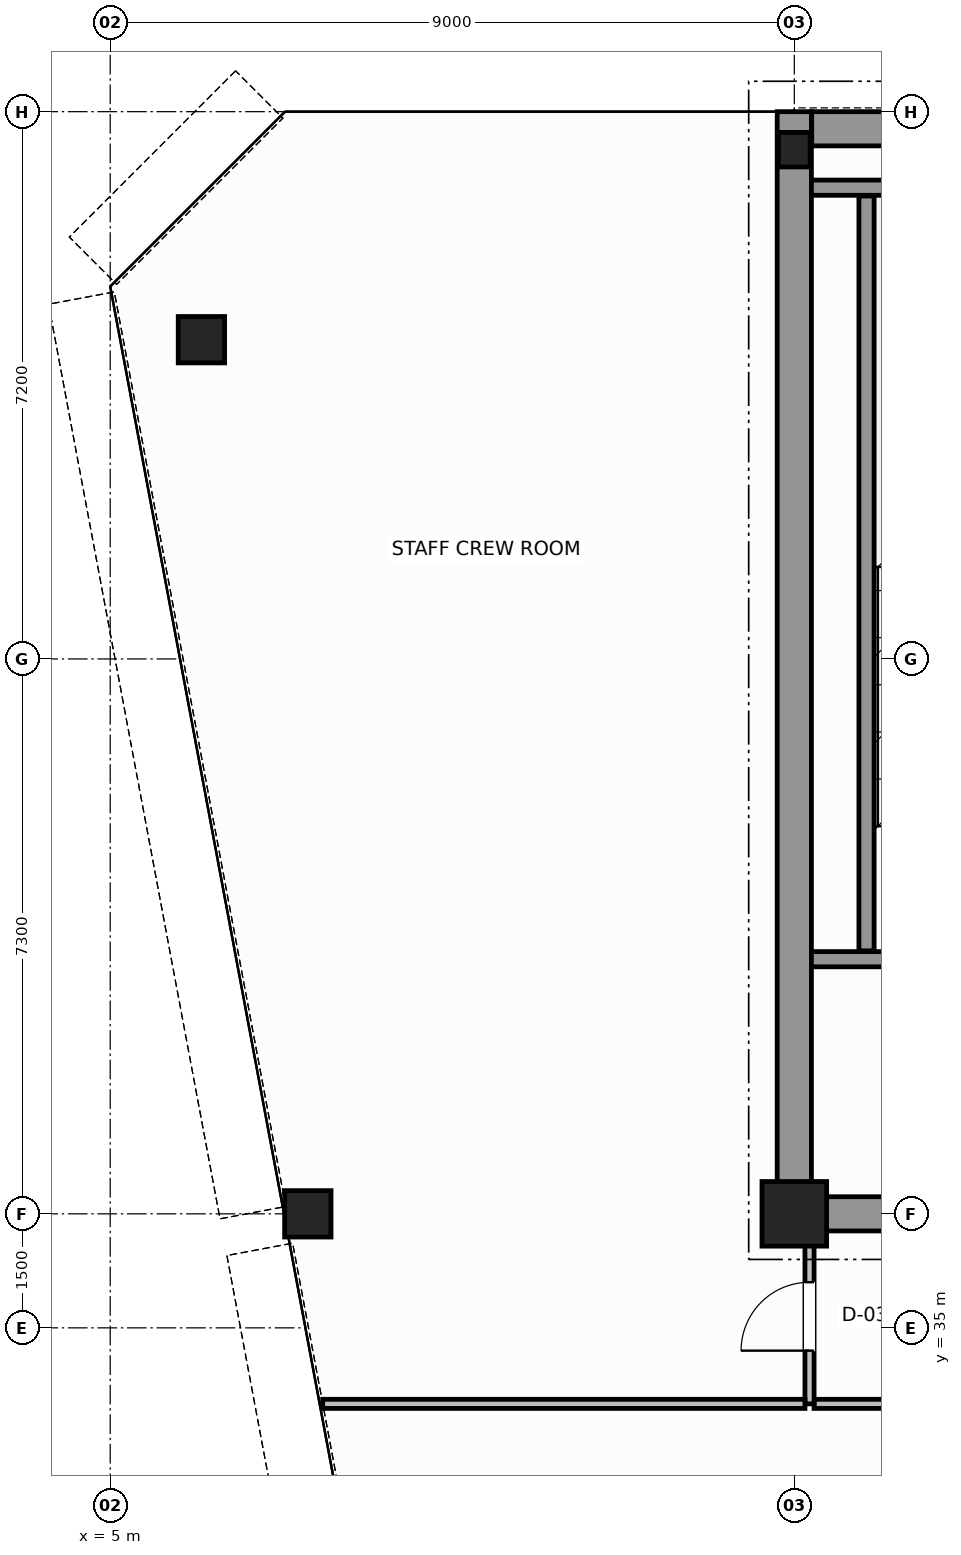
"""IFC4 building model, lengths in metres.
Left out: names, types, materials, properties, quantities, classifications, styles, units other than length and angle.
Written with IfcOpenShell. Run it as: python <this file> out.ifc"""

import sys

from ifc_helpers import new_model, si_unit, direction, frame, frame_2d, origin, origin_2d, place, context, subcontext, project, spatial, rectangle, hollow_circle, i_section, extrude, source, transform, mapped, element, fill, save


model = new_model("IFC4")
c1 = context("Model", 3, precision=1e-05, world=origin(), true_north=direction((0.0, 1.0)))
c2 = subcontext(c1, "Body", "Model", "MODEL_VIEW")
j1 = project(units=[si_unit("LENGTHUNIT", "METRE"), si_unit("PLANEANGLEUNIT", "RADIAN")], contexts=[c1])
p1 = place(None, origin())
s1 = spatial("IfcSite", under=j1, at=p1, CompositionType="ELEMENT")
p2 = place(p1, origin())
s2 = spatial("IfcBuilding", under=s1, at=p2, CompositionType="ELEMENT")
p3 = place(p2, frame((0.0, 0.0, 268.8)))
s3 = spatial("IfcBuildingStorey", under=s2, at=p3, CompositionType="ELEMENT", Elevation=268.8)
m1 = source(origin(), c2, "Body", "SweptSolid", [
    extrude(rectangle(XDim=0.85, YDim=0.85, at=origin_2d()), origin(), (0.0, 0.0, 1.0), 3.8),
])
p4 = place(p3, frame((14.0, 36.5, 0.0), z_axis=(0.0, 0.0, 1.0), x_axis=(1.0, 0.0, 0.0)))
e1 = element("IfcColumn", 1, at=p4, inside=s3, PredefinedType="COLUMN", context=c2, shape_type="MappedRepresentation", body=[
    mapped(m1, transform((0.0, 0.0, 0.0), scale=1.0)),
])
m2 = source(origin(), c2, "Body", "SweptSolid", [
    extrude(i_section(OverallWidth=0.418, OverallDepth=0.455, WebThickness=0.042, FlangeThickness=0.058, FilletRadius=0.015, at=origin_2d()), origin(), (0.0, 0.0, 1.0), 3.8),
])
p5 = place(p3, frame((14.0, 50.5, 0.0), z_axis=(0.0, 0.0, 1.0), x_axis=(1.0, 0.0, 0.0)))
e2 = element("IfcColumn", 2, at=p5, inside=s3, PredefinedType="COLUMN", context=c2, shape_type="MappedRepresentation", body=[
    mapped(m2, transform((0.0, 0.0, 0.0), scale=1.0)),
])
m3 = source(origin(), c2, "Body", "SweptSolid", [
    extrude(hollow_circle(Radius=0.305, WallThickness=0.03, at=origin_2d()), origin(), (0.0, 0.0, 1.0), 3.8),
])
for number, where, z_axis, x_axis in (
    (3, (6.2, 48.0, 0.0), (0.0, 0.0, 1.0), (1.0, 0.0, 0.0)),
    (4, (7.6, 36.5, 0.0), (0.0, 0.0, 1.0), (1.0, 0.0, 0.0)),
):
    element("IfcColumn", number, at=place(p3, frame(where, z_axis=z_axis, x_axis=x_axis)), inside=s3, PredefinedType="COLUMN", context=c2, shape_type="MappedRepresentation", body=[
        mapped(m3, transform((0.0, 0.0, 0.0), scale=1.0)),
    ])
p6 = place(p3, frame((14.229, 50.775, 0.0), z_axis=(0.0, 0.0, 1.0), x_axis=(1.0, 0.0, 0.0)))
e5 = element("IfcWall", 5, at=p6, inside=s3, PredefinedType="SHEAR", context=c2, shape_type="SweptSolid", body=[
    extrude(rectangle(XDim=19.769, YDim=0.45, at=frame_2d((9.885, 0.0))), origin(), (0.0, 0.0, 1.0), 3.8),
])
p7 = place(p3, frame((14.0, 36.5, 0.0), z_axis=(0.0, 0.0, 1.0), x_axis=(0.0, 1.0, 0.0)))
e6 = element("IfcWall", 6, at=p7, inside=s3, PredefinedType="SHEAR", context=c2, shape_type="SweptSolid", body=[
    extrude(rectangle(XDim=14.5, YDim=0.45, at=frame_2d((7.25, 0.0))), origin(), (0.0, 0.0, 1.0), 3.8),
])
p8 = place(p3, frame((14.245, 36.5, 0.0), z_axis=(0.0, 0.0, 1.0), x_axis=(1.0, 0.0, 0.0)))
e7 = element("IfcWall", 7, at=p8, inside=s3, PredefinedType="SHEAR", context=c2, shape_type="SweptSolid", body=[
    extrude(rectangle(XDim=3.955, YDim=0.45, at=frame_2d((1.978, 0.0))), origin(), (0.0, 0.0, 1.0), 2.58),
])
p9 = place(p3, frame((14.225, 39.85, 0.0), z_axis=(0.0, 0.0, 1.0), x_axis=(1.0, 0.0, 0.0)))
e8 = element("IfcWall", 8, at=p9, inside=s3, PredefinedType="SOLIDWALL", context=c2, shape_type="SweptSolid", body=[
    extrude(rectangle(XDim=4.375, YDim=0.2, at=frame_2d((2.188, 0.0))), origin(), (0.0, 0.0, 1.0), 3.8),
])
p10 = place(p9, frame((1.95, 0.0, 0.0)))
e9 = element("IfcOpeningElement", 9, at=p10, cuts=e8, PredefinedType="OPENING", context=c2, shape_type="SweptSolid", body=[
    extrude(rectangle(XDim=1.1, YDim=2.15, at=frame_2d((0.55, 1.075))), frame((0.0, 0.11, 0.0), z_axis=(0.0, -1.0, 0.0), x_axis=(1.0, 0.0, 0.0)), (0.0, 0.0, 1.0), 0.22),
])
p11 = place(p3, frame((14.225, 50.0, 0.0), z_axis=(0.0, 0.0, 1.0), x_axis=(1.0, 0.0, 0.0)))
e10 = element("IfcWall", 10, at=p11, inside=s3, PredefinedType="SOLIDWALL", context=c2, shape_type="SweptSolid", body=[
    extrude(rectangle(XDim=4.375, YDim=0.2, at=frame_2d((2.188, 0.0))), origin(), (0.0, 0.0, 1.0), 3.8),
])
p12 = place(p3, frame((14.95, 39.96, 0.0), z_axis=(0.0, 0.0, 1.0), x_axis=(0.0, 1.0, 0.0)))
e11 = element("IfcWall", 11, at=p12, inside=s3, PredefinedType="SOLIDWALL", context=c2, shape_type="SweptSolid", body=[
    extrude(rectangle(XDim=9.93, YDim=0.2, at=frame_2d((4.965, 0.0))), origin(), (0.0, 0.0, 1.0), 3.8),
])
p13 = place(p3, frame((14.26, 34.0, 0.0), z_axis=(0.0, 0.0, 1.0), x_axis=(1.0, 0.0, 0.0)))
e12 = element("IfcWall", 12, at=p13, inside=s3, PredefinedType="PARTITIONING", context=c2, shape_type="SweptSolid", body=[
    extrude(rectangle(XDim=10.48, YDim=0.12, at=frame_2d((5.24, 0.0))), origin(), (0.0, 0.0, 1.0), 3.58),
])
p14 = place(p3, frame((14.2, 34.0, 0.0), z_axis=(0.0, 0.0, 1.0), x_axis=(0.0, 1.0, 0.0)))
e13 = element("IfcWall", 13, at=p14, inside=s3, PredefinedType="PARTITIONING", context=c2, shape_type="SweptSolid", body=[
    extrude(rectangle(XDim=2.44, YDim=0.12, at=frame_2d((1.22, 0.0))), origin(), (0.0, 0.0, 1.0), 3.58),
])
p15 = place(p14, frame((0.7, 0.0, 0.0)))
e14 = element("IfcOpeningElement", 14, at=p15, cuts=e13, PredefinedType="OPENING", context=c2, shape_type="SweptSolid", body=[
    extrude(rectangle(XDim=0.9, YDim=2.15, at=frame_2d((0.45, 1.075))), frame((0.0, 0.07, 0.0), z_axis=(0.0, -1.0, 0.0), x_axis=(1.0, 0.0, 0.0)), (0.0, 0.0, 1.0), 0.14),
])
p16 = place(p3, frame((7.796, 34.0, 0.0), z_axis=(0.0, 0.0, 1.0), x_axis=(1.0, 0.0, 0.0)))
e15 = element("IfcWall", 15, at=p16, inside=s3, PredefinedType="PARTITIONING", context=c2, shape_type="SweptSolid", body=[
    extrude(rectangle(XDim=6.344, YDim=0.12, at=frame_2d((3.172, 0.0))), origin(), (0.0, 0.0, 1.0), 3.58),
])
m4 = source(origin(), c2, "Body", "SweptSolid", [
    extrude(rectangle(XDim=0.9, YDim=2.15, at=frame_2d((0.45, 1.075))), frame((0.0, 0.025, 0.0), z_axis=(0.0, -1.0, 0.0), x_axis=(1.0, 0.0, 0.0)), (0.0, 0.0, 1.0), 0.05),
])
p17 = place(p15, origin())
e16 = element("IfcDoor", 16, at=p17, inside=s3, OperationType="SINGLE_SWING_LEFT", PredefinedType="DOOR", context=c2, shape_type="MappedRepresentation", body=[
    mapped(m4, transform((0.0, 0.0, 0.0), scale=1.0)),
])
fill(e14, e16)
save(model, sys.argv[1])
